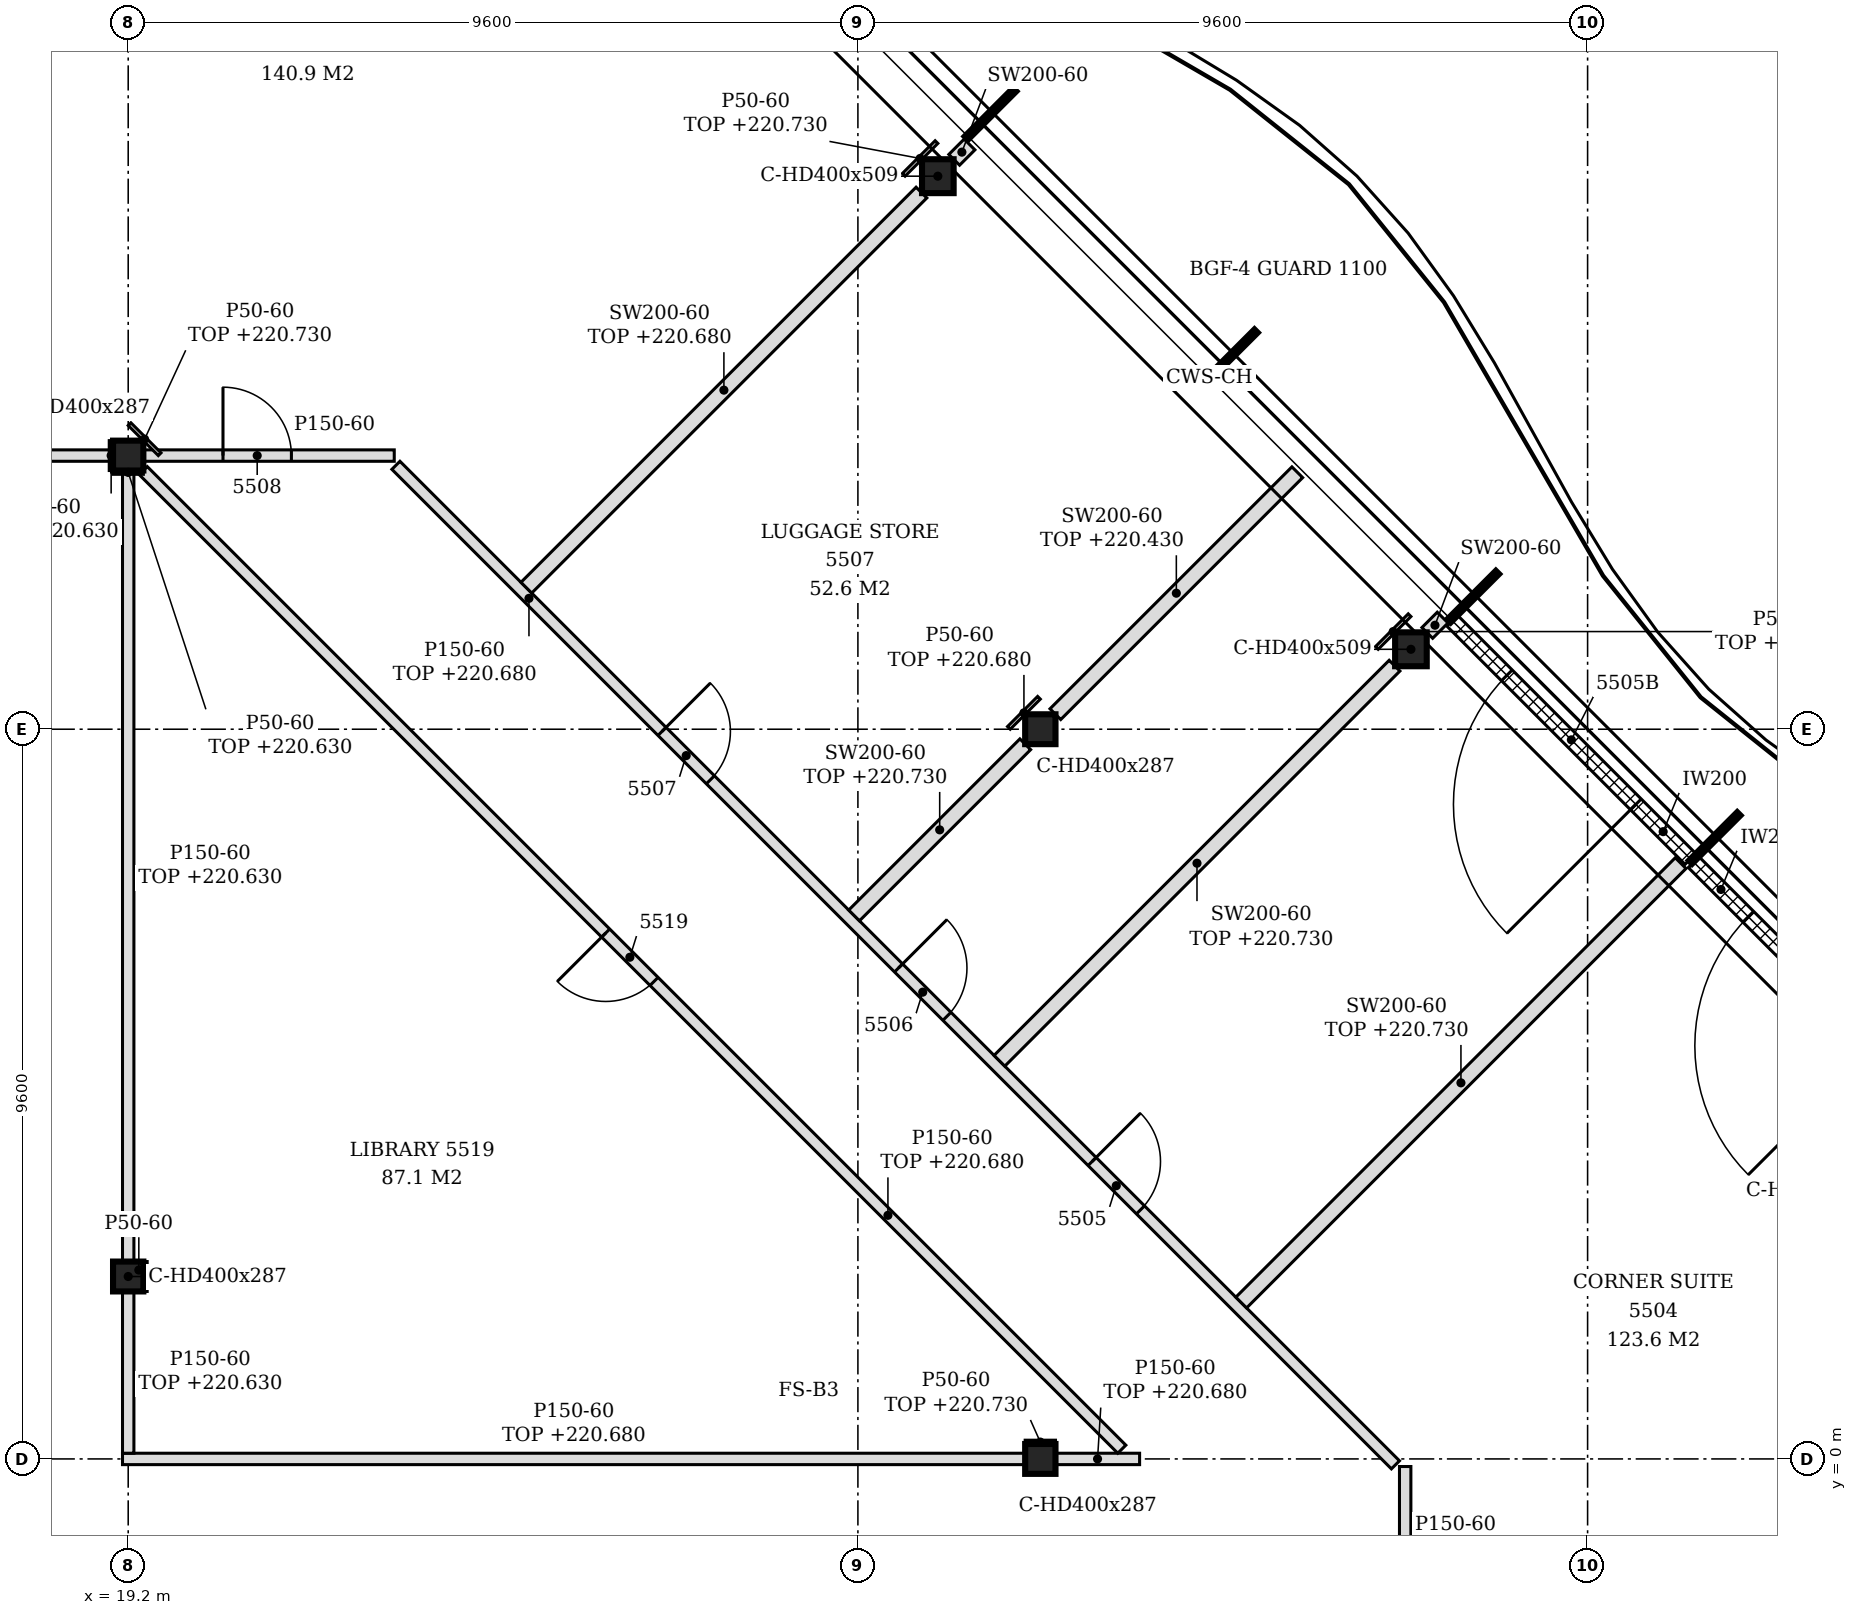
"""IFC4 building model, lengths in metres.
Left out: names, types, materials, properties, quantities, classifications, styles, units other than length and angle.
Written with IfcOpenShell. Run it as: python <this file> out.ifc"""

import sys

from ifc_helpers import new_model, si_unit, direction, frame, frame_2d, origin, origin_2d, place, context, subcontext, project, spatial, polyline, rectangle, i_section, outline, extrude, element, fill, save


model = new_model("IFC4")
c1 = context("Model", 3, precision=1e-05, world=origin(), true_north=direction((0.0, 1.0)))
c2 = subcontext(c1, "Body", "Model", "MODEL_VIEW")
j1 = project(units=[si_unit("LENGTHUNIT", "METRE"), si_unit("PLANEANGLEUNIT", "RADIAN")], contexts=[c1])
p1 = place(None, origin())
s1 = spatial("IfcSite", under=j1, at=p1, CompositionType="ELEMENT")
p2 = place(p1, origin())
s2 = spatial("IfcBuilding", under=s1, at=p2, CompositionType="ELEMENT")
p3 = place(p2, frame((0.0, 0.0, 217.8)))
s3 = spatial("IfcBuildingStorey", under=s2, at=p3, CompositionType="ELEMENT", Elevation=217.8)
for number, where, z_axis, x_axis in (
    (1, (36.076, 10.652, -0.15), (0.0, 0.0, 1.0), (1.0, 0.0, 0.0)),
    (2, (29.852, 16.876, -0.15), (0.0, 0.0, 1.0), (1.0, 0.0, 0.0)),
):
    element("IfcColumn", number, at=place(p3, frame(where, z_axis=z_axis, x_axis=x_axis)), inside=s3, PredefinedType="COLUMN", context=c2, shape_type="SweptSolid", body=[
        extrude(i_section(OverallWidth=0.416, OverallDepth=0.446, WebThickness=0.039, FlangeThickness=0.063, FilletRadius=0.015, at=origin_2d()), origin(), (0.0, 0.0, 1.0), 3.6),
    ])
for number, where, z_axis, x_axis in (
    (3, (19.2, 2.4, -0.15), (0.0, 0.0, 1.0), (1.0, 0.0, 0.0)),
    (4, (19.2, 13.2, -0.15), (0.0, 0.0, 1.0), (1.0, 0.0, 0.0)),
    (5, (31.2, 0.0, -0.15), (0.0, 0.0, 1.0), (1.0, 0.0, 0.0)),
    (6, (31.2, 9.6, -0.15), (0.0, 0.0, 1.0), (1.0, 0.0, 0.0)),
):
    element("IfcColumn", number, at=place(p3, frame(where, z_axis=z_axis, x_axis=x_axis)), inside=s3, PredefinedType="COLUMN", context=c2, shape_type="SweptSolid", body=[
        extrude(i_section(OverallWidth=0.399, OverallDepth=0.393, WebThickness=0.023, FlangeThickness=0.037, FilletRadius=0.015, at=origin_2d()), origin(), (0.0, 0.0, 1.0), 3.6),
    ])
p4 = place(p3, frame((42.922, 4.725, 0.0), z_axis=(0.0, 0.0, 1.0), x_axis=(-0.707079168996, 0.707134392299, 0.0)))
e7 = element("IfcWall", 7, at=p4, inside=s3, PredefinedType="NOTDEFINED", context=c2, shape_type="SweptSolid", body=[
    extrude(rectangle(XDim=4.421, YDim=0.2, at=frame_2d((2.21, 0.0))), origin(), (0.0, 0.0, 1.0), 3.45),
])
p5 = place(p4, frame((1.005, 0.0, 0.0)))
e8 = element("IfcOpeningElement", 8, at=p5, cuts=e7, PredefinedType="OPENING", context=c2, shape_type="SweptSolid", body=[
    extrude(rectangle(XDim=2.4, YDim=2.4, at=frame_2d((1.2, 1.2))), frame((0.0, 0.11, 0.0), z_axis=(0.0, -1.0, 0.0), x_axis=(1.0, 0.0, 0.0)), (0.0, 0.0, 1.0), 0.22),
])
p6 = place(p3, frame((39.753, 7.893, 0.0), z_axis=(0.0, 0.0, 1.0), x_axis=(-0.707106781187, 0.707106781187, 0.0)))
e9 = element("IfcWall", 9, at=p6, inside=s3, PredefinedType="NOTDEFINED", context=c2, shape_type="SweptSolid", body=[
    extrude(rectangle(XDim=4.431, YDim=0.2, at=frame_2d((2.215, 0.0))), origin(), (0.0, 0.0, 1.0), 3.45),
])
p7 = place(p6, frame((1.016, 0.0, 0.0)))
e10 = element("IfcOpeningElement", 10, at=p7, cuts=e9, PredefinedType="OPENING", context=c2, shape_type="SweptSolid", body=[
    extrude(rectangle(XDim=2.4, YDim=2.4, at=frame_2d((1.2, 1.2))), frame((0.0, 0.11, 0.0), z_axis=(0.0, -1.0, 0.0), x_axis=(1.0, 0.0, 0.0)), (0.0, 0.0, 1.0), 0.22),
])
p8 = place(p3, frame((36.0, -1.637, 0.0), z_axis=(0.0, 0.0, 1.0), x_axis=(0.0, 1.0, 0.0)))
e11 = element("IfcWall", 11, at=p8, inside=s3, PredefinedType="PARTITIONING", context=c2, shape_type="SweptSolid", body=[
    extrude(outline(polyline([(0.0, 0.0), (1.537, 0.0), (1.537, 2.88), (1.532, 2.88), (1.53, 3.45), (0.0, 3.45), (0.0, 0.0)])), frame((0.0, 0.075, 0.0), z_axis=(0.0, -1.0, 0.0), x_axis=(1.0, 0.0, 0.0)), (0.0, 0.0, 1.0), 0.15),
])
p9 = place(p3, frame((35.872, -0.078, 0.0), z_axis=(0.0, 0.0, 1.0), x_axis=(-0.707113345155, 0.707100217157, 0.0)))
e12 = element("IfcWall", 12, at=p9, inside=s3, PredefinedType="PARTITIONING", context=c2, shape_type="SweptSolid", body=[
    extrude(rectangle(XDim=18.597, YDim=0.15, at=frame_2d((9.298, 0.0))), origin(), (0.0, 0.0, 1.0), 2.88),
])
p10 = place(p9, frame((4.744, 0.0, 0.0)))
e13 = element("IfcOpeningElement", 13, at=p10, cuts=e12, PredefinedType="OPENING", context=c2, shape_type="SweptSolid", body=[
    extrude(rectangle(XDim=0.9, YDim=2.1, at=frame_2d((0.45, 1.05))), frame((0.0, 0.085, 0.0), z_axis=(0.0, -1.0, 0.0), x_axis=(1.0, 0.0, 0.0)), (0.0, 0.0, 1.0), 0.17),
])
p11 = place(p9, frame((8.345, 0.0, 0.0)))
e14 = element("IfcOpeningElement", 14, at=p11, cuts=e12, PredefinedType="OPENING", context=c2, shape_type="SweptSolid", body=[
    extrude(rectangle(XDim=0.9, YDim=2.1, at=frame_2d((0.45, 1.05))), frame((0.0, 0.085, 0.0), z_axis=(0.0, -1.0, 0.0), x_axis=(1.0, 0.0, 0.0)), (0.0, 0.0, 1.0), 0.17),
])
p12 = place(p9, frame((12.746, 0.0, 0.0)))
e15 = element("IfcOpeningElement", 15, at=p12, cuts=e12, PredefinedType="OPENING", context=c2, shape_type="SweptSolid", body=[
    extrude(rectangle(XDim=0.9, YDim=2.1, at=frame_2d((0.45, 1.05))), frame((0.0, 0.085, 0.0), z_axis=(0.0, -1.0, 0.0), x_axis=(1.0, 0.0, 0.0)), (0.0, 0.0, 1.0), 0.17),
])
p13 = place(p3, frame((19.125, 0.0, 0.0), z_axis=(0.0, 0.0, 1.0), x_axis=(1.0, 0.0, 0.0)))
e16 = element("IfcWall", 16, at=p13, inside=s3, PredefinedType="PARTITIONING", context=c2, shape_type="SweptSolid", body=[
    extrude(outline(polyline([(0.0, 0.0), (11.875, 0.0), (11.875, 2.88), (0.225, 2.88), (0.223, 2.83), (0.0, 2.83), (0.0, 0.0)])), frame((0.0, 0.075, 0.0), z_axis=(0.0, -1.0, 0.0), x_axis=(1.0, 0.0, 0.0)), (0.0, 0.0, 1.0), 0.15),
])
p14 = place(p3, frame((31.399, 0.0, 0.0), z_axis=(0.0, 0.0, 1.0), x_axis=(1.0, 0.0, 0.0)))
e17 = element("IfcWall", 17, at=p14, inside=s3, PredefinedType="PARTITIONING", context=c2, shape_type="SweptSolid", body=[
    extrude(rectangle(XDim=1.107, YDim=0.15, at=frame_2d((0.553, 0.0))), origin(), (0.0, 0.0, 1.0), 2.88),
])
p15 = place(p3, frame((19.2, 0.075, 0.0), z_axis=(0.0, 0.0, 1.0), x_axis=(0.0, 1.0, 0.0)))
e18 = element("IfcWall", 18, at=p15, inside=s3, PredefinedType="PARTITIONING", context=c2, shape_type="SweptSolid", body=[
    extrude(rectangle(XDim=2.129, YDim=0.15, at=frame_2d((1.064, 0.0))), origin(), (0.0, 0.0, 1.0), 2.83),
])
p16 = place(p3, frame((32.272, 0.128, 0.0), z_axis=(0.0, 0.0, 1.0), x_axis=(-0.707106781187, 0.707106781187, 0.0)))
e19 = element("IfcWall", 19, at=p16, inside=s3, PredefinedType="PARTITIONING", context=c2, shape_type="SweptSolid", body=[
    extrude(rectangle(XDim=18.207, YDim=0.15, at=frame_2d((9.103, 0.0))), origin(), (0.0, 0.0, 1.0), 2.88),
])
p17 = place(p16, frame((8.703, 0.0, 0.0)))
e20 = element("IfcOpeningElement", 20, at=p17, cuts=e19, PredefinedType="OPENING", context=c2, shape_type="SweptSolid", body=[
    extrude(rectangle(XDim=0.9, YDim=2.1, at=frame_2d((0.45, 1.05))), frame((0.0, 0.085, 0.0), z_axis=(0.0, -1.0, 0.0), x_axis=(1.0, 0.0, 0.0)), (0.0, 0.0, 1.0), 0.17),
])
p18 = place(p3, frame((33.843, 2.057, 0.0), z_axis=(0.0, 0.0, 1.0), x_axis=(0.70709185088, 0.707121711178, 0.0)))
e21 = element("IfcWall", 21, at=p18, inside=s3, PredefinedType="PARTITIONING", context=c2, shape_type="SweptSolid", body=[
    extrude(rectangle(XDim=8.176, YDim=0.2, at=frame_2d((4.088, 0.0))), origin(), (0.0, 0.0, 1.0), 2.93),
])
p19 = place(p3, frame((19.2, 2.596, 0.0), z_axis=(0.0, 0.0, 1.0), x_axis=(0.0, 1.0, 0.0)))
e22 = element("IfcWall", 22, at=p19, inside=s3, PredefinedType="PARTITIONING", context=c2, shape_type="SweptSolid", body=[
    extrude(rectangle(XDim=10.407, YDim=0.15, at=frame_2d((5.204, 0.0))), origin(), (0.0, 0.0, 1.0), 2.83),
])
p20 = place(p3, frame((30.662, 5.238, 0.0), z_axis=(0.0, 0.0, 1.0), x_axis=(0.707106781187, 0.707106781187, 0.0)))
e23 = element("IfcWall", 23, at=p20, inside=s3, PredefinedType="PARTITIONING", context=c2, shape_type="SweptSolid", body=[
    extrude(rectangle(XDim=7.351, YDim=0.2, at=frame_2d((3.676, 0.0))), origin(), (0.0, 0.0, 1.0), 2.93),
])
p21 = place(p3, frame((28.75, 7.15, 0.0), z_axis=(0.0, 0.0, 1.0), x_axis=(0.7070684525, 0.707145107796, 0.0)))
e24 = element("IfcWall", 24, at=p21, inside=s3, PredefinedType="PARTITIONING", context=c2, shape_type="SweptSolid", body=[
    extrude(rectangle(XDim=3.185, YDim=0.2, at=frame_2d((1.592, 0.0))), origin(), (0.0, 0.0, 1.0), 2.93),
])
p22 = place(p3, frame((31.398, 9.798, 0.0), z_axis=(0.0, 0.0, 1.0), x_axis=(0.707133900936, 0.707079660397, 0.0)))
e25 = element("IfcWall", 25, at=p22, inside=s3, PredefinedType="PARTITIONING", context=c2, shape_type="SweptSolid", body=[
    extrude(rectangle(XDim=4.501, YDim=0.2, at=frame_2d((2.25, 0.0))), origin(), (0.0, 0.0, 1.0), 2.63),
])
p23 = place(p3, frame((36.291, 10.867, 0.0), z_axis=(0.0, 0.0, 1.0), x_axis=(0.707534423513, 0.706678880075, 0.0)))
e26 = element("IfcWall", 26, at=p23, inside=s3, PredefinedType="PARTITIONING", context=c2, shape_type="SweptSolid", body=[
    extrude(rectangle(XDim=0.285, YDim=0.2, at=frame_2d((0.143, 0.0))), origin(), (0.0, 0.0, 1.0), 3.45),
])
p24 = place(p3, frame((24.438, 11.462, 0.0), z_axis=(0.0, 0.0, 1.0), x_axis=(0.707090175614, 0.707123386369, 0.0)))
e27 = element("IfcWall", 27, at=p24, inside=s3, PredefinedType="PARTITIONING", context=c2, shape_type="SweptSolid", body=[
    extrude(rectangle(XDim=7.351, YDim=0.2, at=frame_2d((3.676, 0.0))), origin(), (0.0, 0.0, 1.0), 2.88),
])
p25 = place(p3, frame((7.399, 13.2, 0.0), z_axis=(0.0, 0.0, 1.0), x_axis=(1.0, 0.0, 0.0)))
e28 = element("IfcWall", 28, at=p25, inside=s3, PredefinedType="PARTITIONING", context=c2, shape_type="SweptSolid", body=[
    extrude(rectangle(XDim=11.601, YDim=0.15, at=frame_2d((5.801, 0.0))), origin(), (0.0, 0.0, 1.0), 2.83),
])
p26 = place(p3, frame((19.399, 13.2, 0.0), z_axis=(0.0, 0.0, 1.0), x_axis=(1.0, 0.0, 0.0)))
e29 = element("IfcWall", 29, at=p26, inside=s3, PredefinedType="PARTITIONING", context=c2, shape_type="SweptSolid", body=[
    extrude(rectangle(XDim=3.301, YDim=0.15, at=frame_2d((1.65, 0.0))), origin(), (0.0, 0.0, 1.0), 3.45),
])
p27 = place(p26, frame((1.048, 0.0, 0.0)))
e30 = element("IfcOpeningElement", 30, at=p27, cuts=e29, PredefinedType="OPENING", context=c2, shape_type="SweptSolid", body=[
    extrude(rectangle(XDim=0.9, YDim=2.1, at=frame_2d((0.45, 1.05))), frame((0.0, 0.085, 0.0), z_axis=(0.0, -1.0, 0.0), x_axis=(1.0, 0.0, 0.0)), (0.0, 0.0, 1.0), 0.17),
])
p28 = place(p3, frame((30.067, 17.091, 0.0), z_axis=(0.0, 0.0, 1.0), x_axis=(0.707106781187, 0.707106781187, 0.0)))
e31 = element("IfcWall", 31, at=p28, inside=s3, PredefinedType="PARTITIONING", context=c2, shape_type="SweptSolid", body=[
    extrude(rectangle(XDim=0.285, YDim=0.2, at=frame_2d((0.143, 0.0))), origin(), (0.0, 0.0, 1.0), 3.45),
])
p29 = place(p3, frame((31.0, 0.221, 0.0), z_axis=(0.0, 0.0, 1.0), x_axis=(1.0, 0.0, 0.0)))
e32 = element("IfcWall", 32, at=p29, inside=s3, PredefinedType="PARTITIONING", context=c2, shape_type="SweptSolid", body=[
    extrude(rectangle(XDim=0.399, YDim=0.05, at=frame_2d((0.199, 0.0))), origin(), (0.0, 0.0, 1.0), 2.93),
])
p30 = place(p3, frame((19.425, 2.204, 0.0), z_axis=(0.0, 0.0, 1.0), x_axis=(0.0, 1.0, 0.0)))
e33 = element("IfcWall", 33, at=p30, inside=s3, PredefinedType="PARTITIONING", context=c2, shape_type="SweptSolid", body=[
    extrude(rectangle(XDim=0.393, YDim=0.05, at=frame_2d((0.196, 0.0))), origin(), (0.0, 0.0, 1.0), 3.45),
])
p31 = place(p3, frame((18.976, 13.003, 0.0), z_axis=(0.0, 0.0, 1.0), x_axis=(0.0, 1.0, 0.0)))
e34 = element("IfcWall", 34, at=p31, inside=s3, PredefinedType="PARTITIONING", context=c2, shape_type="SweptSolid", body=[
    extrude(rectangle(XDim=0.393, YDim=0.05, at=frame_2d((0.197, 0.0))), origin(), (0.0, 0.0, 1.0), 2.83),
])
p32 = place(p3, frame((19.614, 13.218, 0.0), z_axis=(0.0, 0.0, 1.0), x_axis=(-0.707106781187, 0.707106781187, 0.0)))
e35 = element("IfcWall", 35, at=p32, inside=s3, PredefinedType="PARTITIONING", context=c2, shape_type="SweptSolid", body=[
    extrude(rectangle(XDim=0.56, YDim=0.05, at=frame_2d((0.28, 0.0))), origin(), (0.0, 0.0, 1.0), 2.93),
])
p33 = place(p3, frame((35.627, 10.669, 0.0), z_axis=(0.0, 0.0, 1.0), x_axis=(0.707307009627, 0.706906496032, 0.0)))
e36 = element("IfcWall", 36, at=p33, inside=s3, PredefinedType="PARTITIONING", context=c2, shape_type="SweptSolid", body=[
    extrude(rectangle(XDim=0.61, YDim=0.05, at=frame_2d((0.305, 0.0))), origin(), (0.0, 0.0, 1.0), 2.63),
])
p34 = place(p3, frame((30.786, 9.618, 0.0), z_axis=(0.0, 0.0, 1.0), x_axis=(0.707106781187, 0.707106781187, 0.0)))
e37 = element("IfcWall", 37, at=p34, inside=s3, PredefinedType="PARTITIONING", context=c2, shape_type="SweptSolid", body=[
    extrude(rectangle(XDim=0.56, YDim=0.05, at=frame_2d((0.28, 0.0))), origin(), (0.0, 0.0, 1.0), 2.88),
])
p35 = place(p3, frame((29.403, 16.893, 0.0), z_axis=(0.0, 0.0, 1.0), x_axis=(0.706906496032, 0.707307009627, 0.0)))
e38 = element("IfcWall", 38, at=p35, inside=s3, PredefinedType="PARTITIONING", context=c2, shape_type="SweptSolid", body=[
    extrude(rectangle(XDim=0.61, YDim=0.05, at=frame_2d((0.305, 0.0))), origin(), (0.0, 0.0, 1.0), 2.93),
])
p36 = place(p3, frame((19.0, 12.979, 0.0), z_axis=(0.0, 0.0, 1.0), x_axis=(1.0, 0.0, 0.0)))
e39 = element("IfcWall", 39, at=p36, inside=s3, PredefinedType="PARTITIONING", context=c2, shape_type="SweptSolid", body=[
    extrude(rectangle(XDim=0.399, YDim=0.05, at=frame_2d((0.199, 0.0))), origin(), (0.0, 0.0, 1.0), 2.83),
])
p37 = place(p5, origin())
e40 = element("IfcDoor", 40, at=p37, inside=s3, OperationType="SINGLE_SWING_LEFT", PredefinedType="DOOR", context=c2, shape_type="SweptSolid", body=[
    extrude(rectangle(XDim=2.4, YDim=2.4, at=frame_2d((1.2, 1.2))), frame((0.0, 0.025, 0.0), z_axis=(0.0, -1.0, 0.0), x_axis=(1.0, 0.0, 0.0)), (0.0, 0.0, 1.0), 0.05),
])
fill(e8, e40)
p38 = place(p7, origin())
e41 = element("IfcDoor", 41, at=p38, inside=s3, OperationType="SINGLE_SWING_LEFT", PredefinedType="DOOR", context=c2, shape_type="SweptSolid", body=[
    extrude(rectangle(XDim=2.4, YDim=2.4, at=frame_2d((1.2, 1.2))), frame((0.0, 0.025, 0.0), z_axis=(0.0, -1.0, 0.0), x_axis=(1.0, 0.0, 0.0)), (0.0, 0.0, 1.0), 0.05),
])
fill(e10, e41)
p39 = place(p10, frame((0.9, 0.0, 0.0), z_axis=(0.0, 0.0, 1.0), x_axis=(-1.0, 0.0, 0.0)))
e42 = element("IfcDoor", 42, at=p39, inside=s3, OperationType="SINGLE_SWING_LEFT", PredefinedType="DOOR", context=c2, shape_type="SweptSolid", body=[
    extrude(rectangle(XDim=0.9, YDim=2.1, at=frame_2d((0.45, 1.05))), frame((0.0, 0.025, 0.0), z_axis=(0.0, -1.0, 0.0), x_axis=(1.0, 0.0, 0.0)), (0.0, 0.0, 1.0), 0.05),
])
fill(e13, e42)
p40 = place(p11, frame((0.9, 0.0, 0.0), z_axis=(0.0, 0.0, 1.0), x_axis=(-1.0, 0.0, 0.0)))
e43 = element("IfcDoor", 43, at=p40, inside=s3, OperationType="SINGLE_SWING_LEFT", PredefinedType="DOOR", context=c2, shape_type="SweptSolid", body=[
    extrude(rectangle(XDim=0.9, YDim=2.1, at=frame_2d((0.45, 1.05))), frame((0.0, 0.025, 0.0), z_axis=(0.0, -1.0, 0.0), x_axis=(1.0, 0.0, 0.0)), (0.0, 0.0, 1.0), 0.05),
])
fill(e14, e43)
p41 = place(p12, frame((0.9, 0.0, 0.0), z_axis=(0.0, 0.0, 1.0), x_axis=(-1.0, 0.0, 0.0)))
e44 = element("IfcDoor", 44, at=p41, inside=s3, OperationType="SINGLE_SWING_LEFT", PredefinedType="DOOR", context=c2, shape_type="SweptSolid", body=[
    extrude(rectangle(XDim=0.9, YDim=2.1, at=frame_2d((0.45, 1.05))), frame((0.0, 0.025, 0.0), z_axis=(0.0, -1.0, 0.0), x_axis=(1.0, 0.0, 0.0)), (0.0, 0.0, 1.0), 0.05),
])
fill(e15, e44)
p42 = place(p27, origin())
e45 = element("IfcDoor", 45, at=p42, inside=s3, OperationType="SINGLE_SWING_LEFT", PredefinedType="DOOR", context=c2, shape_type="SweptSolid", body=[
    extrude(rectangle(XDim=0.9, YDim=2.1, at=frame_2d((0.45, 1.05))), frame((0.0, 0.025, 0.0), z_axis=(0.0, -1.0, 0.0), x_axis=(1.0, 0.0, 0.0)), (0.0, 0.0, 1.0), 0.05),
])
fill(e30, e45)
p43 = place(p17, origin())
e46 = element("IfcDoor", 46, at=p43, inside=s3, OperationType="SINGLE_SWING_RIGHT", PredefinedType="DOOR", context=c2, shape_type="SweptSolid", body=[
    extrude(rectangle(XDim=0.9, YDim=2.1, at=frame_2d((0.45, 1.05))), frame((0.0, 0.025, 0.0), z_axis=(0.0, -1.0, 0.0), x_axis=(1.0, 0.0, 0.0)), (0.0, 0.0, 1.0), 0.05),
])
fill(e20, e46)
save(model, sys.argv[1])
